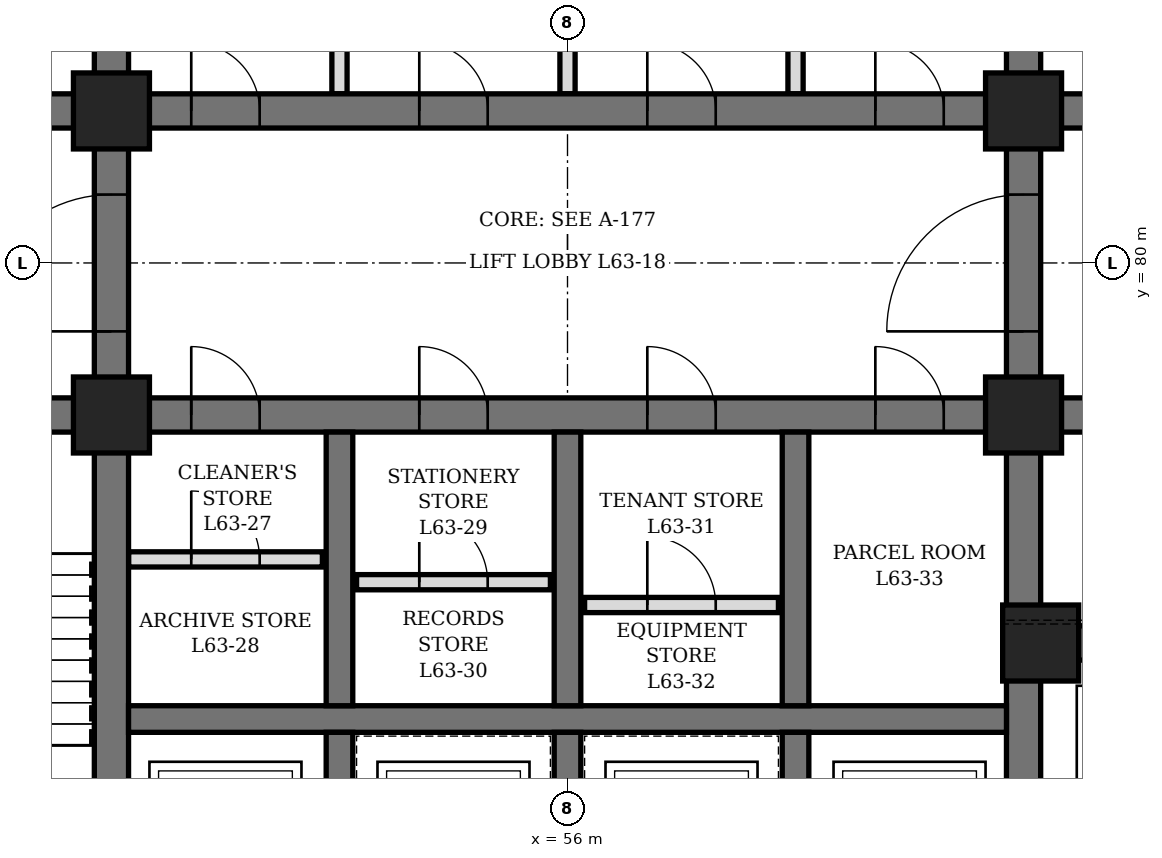
"""IFC4 building model, lengths in metres.
Left out: names, types, materials, properties, quantities, classifications, styles, units other than length and angle.
Written with IfcOpenShell. Run it as: python <this file> out.ifc"""

import sys

from ifc_helpers import new_model, si_unit, direction, frame, frame_2d, origin, origin_2d, place, context, subcontext, project, spatial, rectangle, hollow_rectangle, extrude, element, fill, save


model = new_model("IFC4")
c1 = context("Model", 3, precision=1e-05, world=origin(), true_north=direction((0.0, 1.0)))
c2 = subcontext(c1, "Body", "Model", "MODEL_VIEW")
j1 = project(units=[si_unit("LENGTHUNIT", "METRE"), si_unit("PLANEANGLEUNIT", "RADIAN")], contexts=[c1])
p1 = place(None, origin())
s1 = spatial("IfcSite", under=j1, at=p1, CompositionType="ELEMENT")
p2 = place(p1, origin())
s2 = spatial("IfcBuilding", under=s1, at=p2, CompositionType="ELEMENT")
p3 = place(p2, frame((0.0, 0.0, 279.7)))
s3 = spatial("IfcBuildingStorey", under=s2, at=p3, CompositionType="ELEMENT", Elevation=279.7)
p4 = place(p3, frame((50.0, 71.6, 0.0), z_axis=(0.0, 0.0, 1.0), x_axis=(0.0, 1.0, 0.0)))
e1 = element("IfcWall", 1, at=p4, inside=s3, PredefinedType="SHEAR", context=c2, shape_type="SweptSolid", body=[
    extrude(rectangle(XDim=16.8, YDim=0.45, at=frame_2d((8.4, 0.0))), origin(), (0.0, 0.0, 1.0), 6.0),
])
p5 = place(p4, frame((7.5, 0.0, 0.0)))
e2 = element("IfcOpeningElement", 2, at=p5, cuts=e1, PredefinedType="OPENING", context=c2, shape_type="SweptSolid", body=[
    extrude(rectangle(XDim=1.8, YDim=2.4, at=frame_2d((0.9, 1.2))), frame((0.0, 0.235, 0.0), z_axis=(0.0, -1.0, 0.0), x_axis=(1.0, 0.0, 0.0)), (0.0, 0.0, 1.0), 0.47),
])
p6 = place(p3, frame((62.0, 71.6, 0.0), z_axis=(0.0, 0.0, 1.0), x_axis=(0.0, 1.0, 0.0)))
e3 = element("IfcWall", 3, at=p6, inside=s3, PredefinedType="SHEAR", context=c2, shape_type="SweptSolid", body=[
    extrude(rectangle(XDim=16.8, YDim=0.45, at=frame_2d((8.4, 0.0))), origin(), (0.0, 0.0, 1.0), 6.0),
])
p7 = place(p6, frame((7.5, 0.0, 0.0)))
e4 = element("IfcOpeningElement", 4, at=p7, cuts=e3, PredefinedType="OPENING", context=c2, shape_type="SweptSolid", body=[
    extrude(rectangle(XDim=1.8, YDim=2.4, at=frame_2d((0.9, 1.2))), frame((0.0, 0.235, 0.0), z_axis=(0.0, -1.0, 0.0), x_axis=(1.0, 0.0, 0.0)), (0.0, 0.0, 1.0), 0.47),
])
p8 = place(p3, frame((44.6, 78.0, 0.0), z_axis=(0.0, 0.0, 1.0), x_axis=(1.0, 0.0, 0.0)))
e5 = element("IfcWall", 5, at=p8, inside=s3, PredefinedType="SHEAR", context=c2, shape_type="SweptSolid", body=[
    extrude(rectangle(XDim=5.175, YDim=0.45, at=frame_2d((2.587, 0.0))), origin(), (0.0, 0.0, 1.0), 6.0),
])
p9 = place(p8, frame((1.8, 0.0, 0.0)))
e6 = element("IfcOpeningElement", 6, at=p9, cuts=e5, PredefinedType="OPENING", context=c2, shape_type="SweptSolid", body=[
    extrude(rectangle(XDim=1.2, YDim=2.1, at=frame_2d((0.6, 1.05))), frame((0.0, 0.235, 0.0), z_axis=(0.0, -1.0, 0.0), x_axis=(1.0, 0.0, 0.0)), (0.0, 0.0, 1.0), 0.47),
])
p10 = place(p3, frame((44.6, 82.0, 0.0), z_axis=(0.0, 0.0, 1.0), x_axis=(1.0, 0.0, 0.0)))
e7 = element("IfcWall", 7, at=p10, inside=s3, PredefinedType="SHEAR", context=c2, shape_type="SweptSolid", body=[
    extrude(rectangle(XDim=5.175, YDim=0.45, at=frame_2d((2.587, 0.0))), origin(), (0.0, 0.0, 1.0), 6.0),
])
p11 = place(p10, frame((0.7, 0.0, 0.0)))
e8 = element("IfcOpeningElement", 8, at=p11, cuts=e7, PredefinedType="OPENING", context=c2, shape_type="SweptSolid", body=[
    extrude(rectangle(XDim=0.9, YDim=2.1, at=frame_2d((0.45, 1.05))), frame((0.0, 0.235, 0.0), z_axis=(0.0, -1.0, 0.0), x_axis=(1.0, 0.0, 0.0)), (0.0, 0.0, 1.0), 0.47),
])
p12 = place(p3, frame((62.225, 75.0, 0.0), z_axis=(0.0, 0.0, 1.0), x_axis=(1.0, 0.0, 0.0)))
e9 = element("IfcWall", 9, at=p12, inside=s3, PredefinedType="SHEAR", context=c2, shape_type="SweptSolid", body=[
    extrude(rectangle(XDim=5.175, YDim=0.45, at=frame_2d((2.587, 0.0))), origin(), (0.0, 0.0, 1.0), 6.0),
])
p13 = place(p12, frame((0.675, 0.0, 0.0)))
e10 = element("IfcOpeningElement", 10, at=p13, cuts=e9, PredefinedType="OPENING", context=c2, shape_type="SweptSolid", body=[
    extrude(rectangle(XDim=1.2, YDim=2.2, at=frame_2d((0.6, 1.1))), frame((0.0, 0.235, 0.0), z_axis=(0.0, -1.0, 0.0), x_axis=(1.0, 0.0, 0.0)), (0.0, 0.0, 1.0), 0.47),
])
p14 = place(p12, frame((3.425, 0.0, 0.0)))
e11 = element("IfcOpeningElement", 11, at=p14, cuts=e9, PredefinedType="OPENING", context=c2, shape_type="SweptSolid", body=[
    extrude(rectangle(XDim=1.2, YDim=2.2, at=frame_2d((0.6, 1.1))), frame((0.0, 0.235, 0.0), z_axis=(0.0, -1.0, 0.0), x_axis=(1.0, 0.0, 0.0)), (0.0, 0.0, 1.0), 0.47),
])
p15 = place(p3, frame((62.225, 78.0, 0.0), z_axis=(0.0, 0.0, 1.0), x_axis=(1.0, 0.0, 0.0)))
e12 = element("IfcWall", 12, at=p15, inside=s3, PredefinedType="SHEAR", context=c2, shape_type="SweptSolid", body=[
    extrude(rectangle(XDim=5.175, YDim=0.45, at=frame_2d((2.587, 0.0))), origin(), (0.0, 0.0, 1.0), 6.0),
])
p16 = place(p15, frame((2.175, 0.0, 0.0)))
e13 = element("IfcOpeningElement", 13, at=p16, cuts=e12, PredefinedType="OPENING", context=c2, shape_type="SweptSolid", body=[
    extrude(rectangle(XDim=1.2, YDim=2.1, at=frame_2d((0.6, 1.05))), frame((0.0, 0.235, 0.0), z_axis=(0.0, -1.0, 0.0), x_axis=(1.0, 0.0, 0.0)), (0.0, 0.0, 1.0), 0.47),
])
p17 = place(p3, frame((62.225, 82.0, 0.0), z_axis=(0.0, 0.0, 1.0), x_axis=(1.0, 0.0, 0.0)))
e14 = element("IfcWall", 14, at=p17, inside=s3, PredefinedType="SHEAR", context=c2, shape_type="SweptSolid", body=[
    extrude(rectangle(XDim=5.175, YDim=0.45, at=frame_2d((2.587, 0.0))), origin(), (0.0, 0.0, 1.0), 6.0),
])
p18 = place(p17, frame((2.175, 0.0, 0.0)))
e15 = element("IfcOpeningElement", 15, at=p18, cuts=e14, PredefinedType="OPENING", context=c2, shape_type="SweptSolid", body=[
    extrude(rectangle(XDim=1.2, YDim=2.1, at=frame_2d((0.6, 1.05))), frame((0.0, 0.235, 0.0), z_axis=(0.0, -1.0, 0.0), x_axis=(1.0, 0.0, 0.0)), (0.0, 0.0, 1.0), 0.47),
])
p19 = place(p3, frame((50.225, 78.0, 0.0), z_axis=(0.0, 0.0, 1.0), x_axis=(1.0, 0.0, 0.0)))
e16 = element("IfcWall", 16, at=p19, inside=s3, PredefinedType="SHEAR", context=c2, shape_type="SweptSolid", body=[
    extrude(rectangle(XDim=11.55, YDim=0.45, at=frame_2d((5.775, 0.0))), origin(), (0.0, 0.0, 1.0), 6.0),
])
p20 = place(p19, frame((0.825, 0.0, 0.0)))
e17 = element("IfcOpeningElement", 17, at=p20, cuts=e16, PredefinedType="OPENING", context=c2, shape_type="SweptSolid", body=[
    extrude(rectangle(XDim=0.9, YDim=2.1, at=frame_2d((0.45, 1.05))), frame((0.0, 0.235, 0.0), z_axis=(0.0, -1.0, 0.0), x_axis=(1.0, 0.0, 0.0)), (0.0, 0.0, 1.0), 0.47),
])
p21 = place(p19, frame((3.825, 0.0, 0.0)))
e18 = element("IfcOpeningElement", 18, at=p21, cuts=e16, PredefinedType="OPENING", context=c2, shape_type="SweptSolid", body=[
    extrude(rectangle(XDim=0.9, YDim=2.1, at=frame_2d((0.45, 1.05))), frame((0.0, 0.235, 0.0), z_axis=(0.0, -1.0, 0.0), x_axis=(1.0, 0.0, 0.0)), (0.0, 0.0, 1.0), 0.47),
])
p22 = place(p19, frame((6.825, 0.0, 0.0)))
e19 = element("IfcOpeningElement", 19, at=p22, cuts=e16, PredefinedType="OPENING", context=c2, shape_type="SweptSolid", body=[
    extrude(rectangle(XDim=0.9, YDim=2.1, at=frame_2d((0.45, 1.05))), frame((0.0, 0.235, 0.0), z_axis=(0.0, -1.0, 0.0), x_axis=(1.0, 0.0, 0.0)), (0.0, 0.0, 1.0), 0.47),
])
p23 = place(p19, frame((9.825, 0.0, 0.0)))
e20 = element("IfcOpeningElement", 20, at=p23, cuts=e16, PredefinedType="OPENING", context=c2, shape_type="SweptSolid", body=[
    extrude(rectangle(XDim=0.9, YDim=2.1, at=frame_2d((0.45, 1.05))), frame((0.0, 0.235, 0.0), z_axis=(0.0, -1.0, 0.0), x_axis=(1.0, 0.0, 0.0)), (0.0, 0.0, 1.0), 0.47),
])
p24 = place(p3, frame((50.225, 82.0, 0.0), z_axis=(0.0, 0.0, 1.0), x_axis=(1.0, 0.0, 0.0)))
e21 = element("IfcWall", 21, at=p24, inside=s3, PredefinedType="SHEAR", context=c2, shape_type="SweptSolid", body=[
    extrude(rectangle(XDim=11.55, YDim=0.45, at=frame_2d((5.775, 0.0))), origin(), (0.0, 0.0, 1.0), 6.0),
])
p25 = place(p24, frame((0.825, 0.0, 0.0)))
e22 = element("IfcOpeningElement", 22, at=p25, cuts=e21, PredefinedType="OPENING", context=c2, shape_type="SweptSolid", body=[
    extrude(rectangle(XDim=0.9, YDim=2.1, at=frame_2d((0.45, 1.05))), frame((0.0, 0.235, 0.0), z_axis=(0.0, -1.0, 0.0), x_axis=(1.0, 0.0, 0.0)), (0.0, 0.0, 1.0), 0.47),
])
p26 = place(p24, frame((3.825, 0.0, 0.0)))
e23 = element("IfcOpeningElement", 23, at=p26, cuts=e21, PredefinedType="OPENING", context=c2, shape_type="SweptSolid", body=[
    extrude(rectangle(XDim=0.9, YDim=2.1, at=frame_2d((0.45, 1.05))), frame((0.0, 0.235, 0.0), z_axis=(0.0, -1.0, 0.0), x_axis=(1.0, 0.0, 0.0)), (0.0, 0.0, 1.0), 0.47),
])
p27 = place(p24, frame((6.825, 0.0, 0.0)))
e24 = element("IfcOpeningElement", 24, at=p27, cuts=e21, PredefinedType="OPENING", context=c2, shape_type="SweptSolid", body=[
    extrude(rectangle(XDim=0.9, YDim=2.1, at=frame_2d((0.45, 1.05))), frame((0.0, 0.235, 0.0), z_axis=(0.0, -1.0, 0.0), x_axis=(1.0, 0.0, 0.0)), (0.0, 0.0, 1.0), 0.47),
])
p28 = place(p24, frame((9.825, 0.0, 0.0)))
e25 = element("IfcOpeningElement", 25, at=p28, cuts=e21, PredefinedType="OPENING", context=c2, shape_type="SweptSolid", body=[
    extrude(rectangle(XDim=0.9, YDim=2.1, at=frame_2d((0.45, 1.05))), frame((0.0, 0.235, 0.0), z_axis=(0.0, -1.0, 0.0), x_axis=(1.0, 0.0, 0.0)), (0.0, 0.0, 1.0), 0.47),
])
p29 = place(p3, frame((50.225, 74.0, 0.0), z_axis=(0.0, 0.0, 1.0), x_axis=(1.0, 0.0, 0.0)))
e26 = element("IfcWall", 26, at=p29, inside=s3, PredefinedType="SHEAR", context=c2, shape_type="SweptSolid", body=[
    extrude(rectangle(XDim=11.55, YDim=0.35, at=frame_2d((5.775, 0.0))), origin(), (0.0, 0.0, 1.0), 6.0),
])
p30 = place(p3, frame((53.0, 71.6, 0.0), z_axis=(0.0, 0.0, 1.0), x_axis=(0.0, 1.0, 0.0)))
e27 = element("IfcWall", 27, at=p30, inside=s3, PredefinedType="SHEAR", context=c2, shape_type="SweptSolid", body=[
    extrude(rectangle(XDim=2.225, YDim=0.35, at=frame_2d((1.112, 0.0))), origin(), (0.0, 0.0, 1.0), 6.0),
])
p31 = place(p3, frame((53.0, 74.175, 0.0), z_axis=(0.0, 0.0, 1.0), x_axis=(0.0, 1.0, 0.0)))
e28 = element("IfcWall", 28, at=p31, inside=s3, PredefinedType="SHEAR", context=c2, shape_type="SweptSolid", body=[
    extrude(rectangle(XDim=3.6, YDim=0.35, at=frame_2d((1.8, 0.0))), origin(), (0.0, 0.0, 1.0), 6.0),
])
p32 = place(p3, frame((56.0, 71.6, 0.0), z_axis=(0.0, 0.0, 1.0), x_axis=(0.0, 1.0, 0.0)))
e29 = element("IfcWall", 29, at=p32, inside=s3, PredefinedType="SHEAR", context=c2, shape_type="SweptSolid", body=[
    extrude(rectangle(XDim=2.225, YDim=0.35, at=frame_2d((1.112, 0.0))), origin(), (0.0, 0.0, 1.0), 6.0),
])
p33 = place(p3, frame((56.0, 74.175, 0.0), z_axis=(0.0, 0.0, 1.0), x_axis=(0.0, 1.0, 0.0)))
e30 = element("IfcWall", 30, at=p33, inside=s3, PredefinedType="SHEAR", context=c2, shape_type="SweptSolid", body=[
    extrude(rectangle(XDim=3.6, YDim=0.35, at=frame_2d((1.8, 0.0))), origin(), (0.0, 0.0, 1.0), 6.0),
])
p34 = place(p3, frame((59.0, 71.6, 0.0), z_axis=(0.0, 0.0, 1.0), x_axis=(0.0, 1.0, 0.0)))
e31 = element("IfcWall", 31, at=p34, inside=s3, PredefinedType="SHEAR", context=c2, shape_type="SweptSolid", body=[
    extrude(rectangle(XDim=2.225, YDim=0.35, at=frame_2d((1.112, 0.0))), origin(), (0.0, 0.0, 1.0), 6.0),
])
p35 = place(p3, frame((59.0, 74.175, 0.0), z_axis=(0.0, 0.0, 1.0), x_axis=(0.0, 1.0, 0.0)))
e32 = element("IfcWall", 32, at=p35, inside=s3, PredefinedType="SHEAR", context=c2, shape_type="SweptSolid", body=[
    extrude(rectangle(XDim=3.6, YDim=0.35, at=frame_2d((1.8, 0.0))), origin(), (0.0, 0.0, 1.0), 6.0),
])
for number, where, z_axis, x_axis in (
    (33, (50.0, 78.0, 0.0), (0.0, 0.0, 1.0), (1.0, 0.0, 0.0)),
    (34, (50.0, 82.0, 0.0), (0.0, 0.0, 1.0), (1.0, 0.0, 0.0)),
    (35, (62.0, 78.0, 0.0), (0.0, 0.0, 1.0), (1.0, 0.0, 0.0)),
    (36, (62.0, 82.0, 0.0), (0.0, 0.0, 1.0), (1.0, 0.0, 0.0)),
    (37, (62.225, 75.0, 0.0), (0.0, 0.0, 1.0), (1.0, 0.0, 0.0)),
):
    element("IfcColumn", number, at=place(p3, frame(where, z_axis=z_axis, x_axis=x_axis)), inside=s3, PredefinedType="COLUMN", context=c2, shape_type="SweptSolid", body=[
        extrude(hollow_rectangle(XDim=1.0, YDim=1.0, WallThickness=0.15, at=origin_2d()), origin(), (0.0, 0.0, 1.0), 6.0),
    ])
p36 = place(p3, frame((50.225, 76.1, 0.0), z_axis=(0.0, 0.0, 1.0), x_axis=(1.0, 0.0, 0.0)))
e38 = element("IfcWall", 38, at=p36, inside=s3, PredefinedType="PARTITIONING", context=c2, shape_type="SweptSolid", body=[
    extrude(rectangle(XDim=2.55, YDim=0.2, at=frame_2d((1.275, 0.0))), origin(), (0.0, 0.0, 1.0), 5.75),
])
p37 = place(p36, frame((0.825, 0.0, 0.0)))
e39 = element("IfcOpeningElement", 39, at=p37, cuts=e38, PredefinedType="OPENING", context=c2, shape_type="SweptSolid", body=[
    extrude(rectangle(XDim=0.9, YDim=2.1, at=frame_2d((0.45, 1.05))), frame((0.0, 0.11, 0.0), z_axis=(0.0, -1.0, 0.0), x_axis=(1.0, 0.0, 0.0)), (0.0, 0.0, 1.0), 0.22),
])
p38 = place(p3, frame((53.225, 75.8, 0.0), z_axis=(0.0, 0.0, 1.0), x_axis=(1.0, 0.0, 0.0)))
e40 = element("IfcWall", 40, at=p38, inside=s3, PredefinedType="PARTITIONING", context=c2, shape_type="SweptSolid", body=[
    extrude(rectangle(XDim=2.55, YDim=0.2, at=frame_2d((1.275, 0.0))), origin(), (0.0, 0.0, 1.0), 5.75),
])
p39 = place(p38, frame((0.825, 0.0, 0.0)))
e41 = element("IfcOpeningElement", 41, at=p39, cuts=e40, PredefinedType="OPENING", context=c2, shape_type="SweptSolid", body=[
    extrude(rectangle(XDim=0.9, YDim=2.1, at=frame_2d((0.45, 1.05))), frame((0.0, 0.11, 0.0), z_axis=(0.0, -1.0, 0.0), x_axis=(1.0, 0.0, 0.0)), (0.0, 0.0, 1.0), 0.22),
])
p40 = place(p3, frame((56.225, 75.5, 0.0), z_axis=(0.0, 0.0, 1.0), x_axis=(1.0, 0.0, 0.0)))
e42 = element("IfcWall", 42, at=p40, inside=s3, PredefinedType="PARTITIONING", context=c2, shape_type="SweptSolid", body=[
    extrude(rectangle(XDim=2.55, YDim=0.2, at=frame_2d((1.275, 0.0))), origin(), (0.0, 0.0, 1.0), 5.75),
])
p41 = place(p40, frame((0.825, 0.0, 0.0)))
e43 = element("IfcOpeningElement", 43, at=p41, cuts=e42, PredefinedType="OPENING", context=c2, shape_type="SweptSolid", body=[
    extrude(rectangle(XDim=0.9, YDim=2.1, at=frame_2d((0.45, 1.05))), frame((0.0, 0.11, 0.0), z_axis=(0.0, -1.0, 0.0), x_axis=(1.0, 0.0, 0.0)), (0.0, 0.0, 1.0), 0.22),
])
p42 = place(p3, frame((53.0, 82.225, 0.0), z_axis=(0.0, 0.0, 1.0), x_axis=(0.0, 1.0, 0.0)))
e44 = element("IfcWall", 44, at=p42, inside=s3, PredefinedType="PARTITIONING", context=c2, shape_type="SweptSolid", body=[
    extrude(rectangle(XDim=3.55, YDim=0.2, at=frame_2d((1.775, 0.0))), origin(), (0.0, 0.0, 1.0), 5.75),
])
p43 = place(p3, frame((56.0, 82.225, 0.0), z_axis=(0.0, 0.0, 1.0), x_axis=(0.0, 1.0, 0.0)))
e45 = element("IfcWall", 45, at=p43, inside=s3, PredefinedType="PARTITIONING", context=c2, shape_type="SweptSolid", body=[
    extrude(rectangle(XDim=3.55, YDim=0.2, at=frame_2d((1.775, 0.0))), origin(), (0.0, 0.0, 1.0), 4.25),
])
p44 = place(p3, frame((59.0, 82.225, 0.0), z_axis=(0.0, 0.0, 1.0), x_axis=(0.0, 1.0, 0.0)))
e46 = element("IfcWall", 46, at=p44, inside=s3, PredefinedType="PARTITIONING", context=c2, shape_type="SweptSolid", body=[
    extrude(rectangle(XDim=3.55, YDim=0.2, at=frame_2d((1.775, 0.0))), origin(), (0.0, 0.0, 1.0), 5.75),
])
p45 = place(p20, origin())
e47 = element("IfcDoor", 47, at=p45, inside=s3, OperationType="SINGLE_SWING_LEFT", PredefinedType="DOOR", context=c2, shape_type="SweptSolid", body=[
    extrude(rectangle(XDim=0.9, YDim=2.1, at=frame_2d((0.45, 1.05))), frame((0.0, 0.225, 0.0), z_axis=(0.0, -1.0, 0.0), x_axis=(1.0, 0.0, 0.0)), (0.0, 0.0, 1.0), 0.449),
])
fill(e17, e47)
p46 = place(p37, origin())
e48 = element("IfcDoor", 48, at=p46, inside=s3, OperationType="SINGLE_SWING_LEFT", PredefinedType="DOOR", context=c2, shape_type="SweptSolid", body=[
    extrude(rectangle(XDim=0.9, YDim=2.1, at=frame_2d((0.45, 1.05))), frame((0.0, 0.1, 0.0), z_axis=(0.0, -1.0, 0.0), x_axis=(1.0, 0.0, 0.0)), (0.0, 0.0, 1.0), 0.199),
])
fill(e39, e48)
p47 = place(p21, origin())
e49 = element("IfcDoor", 49, at=p47, inside=s3, OperationType="SINGLE_SWING_LEFT", PredefinedType="DOOR", context=c2, shape_type="SweptSolid", body=[
    extrude(rectangle(XDim=0.9, YDim=2.1, at=frame_2d((0.45, 1.05))), frame((0.0, 0.225, 0.0), z_axis=(0.0, -1.0, 0.0), x_axis=(1.0, 0.0, 0.0)), (0.0, 0.0, 1.0), 0.449),
])
fill(e18, e49)
p48 = place(p39, origin())
e50 = element("IfcDoor", 50, at=p48, inside=s3, OperationType="SINGLE_SWING_LEFT", PredefinedType="DOOR", context=c2, shape_type="SweptSolid", body=[
    extrude(rectangle(XDim=0.9, YDim=2.1, at=frame_2d((0.45, 1.05))), frame((0.0, 0.1, 0.0), z_axis=(0.0, -1.0, 0.0), x_axis=(1.0, 0.0, 0.0)), (0.0, 0.0, 1.0), 0.199),
])
fill(e41, e50)
p49 = place(p22, origin())
e51 = element("IfcDoor", 51, at=p49, inside=s3, OperationType="SINGLE_SWING_LEFT", PredefinedType="DOOR", context=c2, shape_type="SweptSolid", body=[
    extrude(rectangle(XDim=0.9, YDim=2.1, at=frame_2d((0.45, 1.05))), frame((0.0, 0.225, 0.0), z_axis=(0.0, -1.0, 0.0), x_axis=(1.0, 0.0, 0.0)), (0.0, 0.0, 1.0), 0.449),
])
fill(e19, e51)
p50 = place(p41, origin())
e52 = element("IfcDoor", 52, at=p50, inside=s3, OperationType="SINGLE_SWING_LEFT", PredefinedType="DOOR", context=c2, shape_type="SweptSolid", body=[
    extrude(rectangle(XDim=0.9, YDim=2.1, at=frame_2d((0.45, 1.05))), frame((0.0, 0.1, 0.0), z_axis=(0.0, -1.0, 0.0), x_axis=(1.0, 0.0, 0.0)), (0.0, 0.0, 1.0), 0.199),
])
fill(e43, e52)
p51 = place(p23, origin())
e53 = element("IfcDoor", 53, at=p51, inside=s3, OperationType="SINGLE_SWING_LEFT", PredefinedType="DOOR", context=c2, shape_type="SweptSolid", body=[
    extrude(rectangle(XDim=0.9, YDim=2.1, at=frame_2d((0.45, 1.05))), frame((0.0, 0.225, 0.0), z_axis=(0.0, -1.0, 0.0), x_axis=(1.0, 0.0, 0.0)), (0.0, 0.0, 1.0), 0.449),
])
fill(e20, e53)
p52 = place(p25, origin())
e54 = element("IfcDoor", 54, at=p52, inside=s3, OperationType="SINGLE_SWING_LEFT", PredefinedType="DOOR", context=c2, shape_type="SweptSolid", body=[
    extrude(rectangle(XDim=0.9, YDim=2.1, at=frame_2d((0.45, 1.05))), frame((0.0, 0.225, 0.0), z_axis=(0.0, -1.0, 0.0), x_axis=(1.0, 0.0, 0.0)), (0.0, 0.0, 1.0), 0.449),
])
fill(e22, e54)
p53 = place(p26, origin())
e55 = element("IfcDoor", 55, at=p53, inside=s3, OperationType="SINGLE_SWING_LEFT", PredefinedType="DOOR", context=c2, shape_type="SweptSolid", body=[
    extrude(rectangle(XDim=0.9, YDim=2.1, at=frame_2d((0.45, 1.05))), frame((0.0, 0.225, 0.0), z_axis=(0.0, -1.0, 0.0), x_axis=(1.0, 0.0, 0.0)), (0.0, 0.0, 1.0), 0.449),
])
fill(e23, e55)
p54 = place(p27, origin())
e56 = element("IfcDoor", 56, at=p54, inside=s3, OperationType="SINGLE_SWING_LEFT", PredefinedType="DOOR", context=c2, shape_type="SweptSolid", body=[
    extrude(rectangle(XDim=0.9, YDim=2.1, at=frame_2d((0.45, 1.05))), frame((0.0, 0.225, 0.0), z_axis=(0.0, -1.0, 0.0), x_axis=(1.0, 0.0, 0.0)), (0.0, 0.0, 1.0), 0.449),
])
fill(e24, e56)
p55 = place(p28, origin())
e57 = element("IfcDoor", 57, at=p55, inside=s3, OperationType="SINGLE_SWING_LEFT", PredefinedType="DOOR", context=c2, shape_type="SweptSolid", body=[
    extrude(rectangle(XDim=0.9, YDim=2.1, at=frame_2d((0.45, 1.05))), frame((0.0, 0.225, 0.0), z_axis=(0.0, -1.0, 0.0), x_axis=(1.0, 0.0, 0.0)), (0.0, 0.0, 1.0), 0.449),
])
fill(e25, e57)
p56 = place(p5, origin())
e58 = element("IfcDoor", 58, at=p56, inside=s3, OperationType="DOUBLE_DOOR_SINGLE_SWING", PredefinedType="DOOR", context=c2, shape_type="SweptSolid", body=[
    extrude(rectangle(XDim=1.8, YDim=2.4, at=frame_2d((0.9, 1.2))), frame((0.0, 0.225, 0.0), z_axis=(0.0, -1.0, 0.0), x_axis=(1.0, 0.0, 0.0)), (0.0, 0.0, 1.0), 0.449),
])
fill(e2, e58)
p57 = place(p7, origin())
e59 = element("IfcDoor", 59, at=p57, inside=s3, OperationType="DOUBLE_DOOR_SINGLE_SWING", PredefinedType="DOOR", context=c2, shape_type="SweptSolid", body=[
    extrude(rectangle(XDim=1.8, YDim=2.4, at=frame_2d((0.9, 1.2))), frame((0.0, 0.225, 0.0), z_axis=(0.0, -1.0, 0.0), x_axis=(1.0, 0.0, 0.0)), (0.0, 0.0, 1.0), 0.449),
])
fill(e4, e59)
save(model, sys.argv[1])
